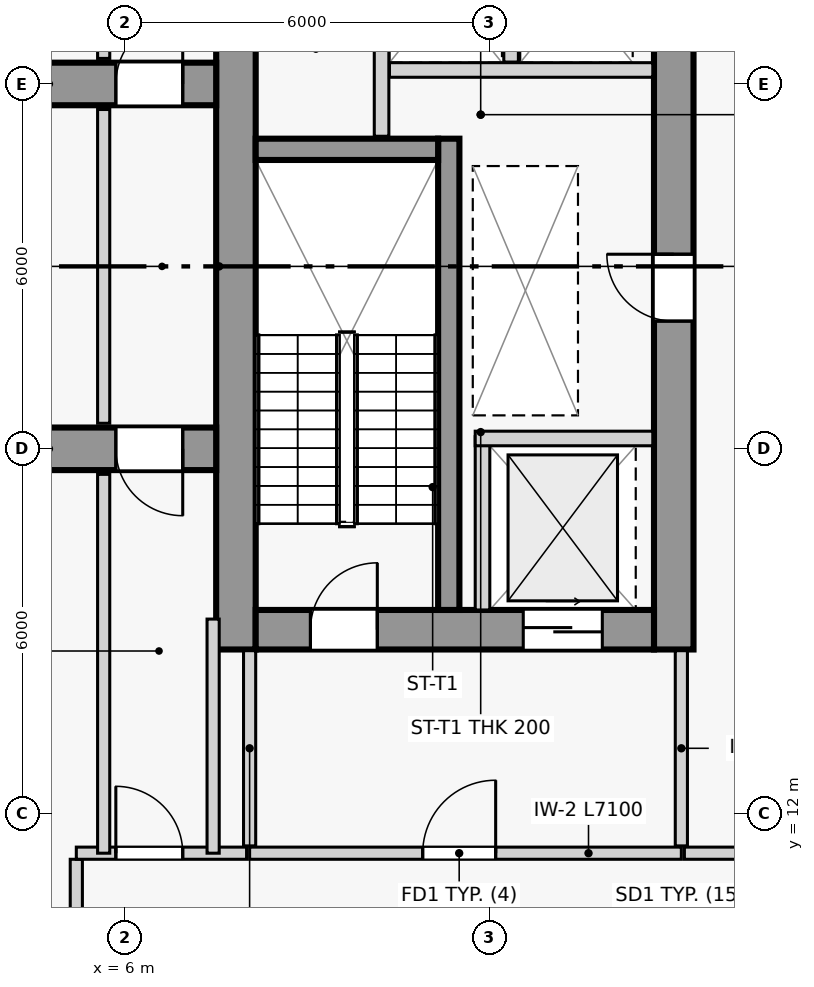
"""IFC4 building model, lengths in metres.
Left out: names, types, materials, properties, quantities, classifications, styles, units other than length and angle.
Written with IfcOpenShell. Run it as: python <this file> out.ifc"""

import sys

from ifc_helpers import new_model, si_unit, direction, frame, frame_2d, origin, place, context, subcontext, project, spatial, rectangle, extrude, source, transform, mapped, element, fill, save


model = new_model("IFC4")
c1 = context("Model", 3, precision=1e-05, world=origin(), true_north=direction((0.0, 1.0)))
c2 = subcontext(c1, "Body", "Model", "MODEL_VIEW")
j1 = project(units=[si_unit("LENGTHUNIT", "METRE"), si_unit("PLANEANGLEUNIT", "RADIAN")], contexts=[c1])
p1 = place(None, origin())
s1 = spatial("IfcSite", under=j1, at=p1, CompositionType="ELEMENT")
p2 = place(p1, origin())
s2 = spatial("IfcBuilding", under=s1, at=p2, CompositionType="ELEMENT")
p3 = place(p2, frame((0.0, 0.0, 220.5)))
s3 = spatial("IfcBuildingStorey", under=s2, at=p3, CompositionType="ELEMENT", Elevation=220.5)
p4 = place(p3, frame((7.825, 14.7, 0.0), z_axis=(0.0, 0.0, 1.0), x_axis=(0.0, 1.0, 0.0)))
e1 = element("IfcWall", 1, at=p4, inside=s3, PredefinedType="SHEAR", context=c2, shape_type="SweptSolid", body=[
    extrude(rectangle(XDim=12.65, YDim=0.65, at=frame_2d((6.325, 0.0))), origin(), (0.0, 0.0, 1.0), 7.2),
])
p5 = place(p3, frame((15.025, 14.7, 0.0), z_axis=(0.0, 0.0, 1.0), x_axis=(0.0, 1.0, 0.0)))
e2 = element("IfcWall", 2, at=p5, inside=s3, PredefinedType="SHEAR", context=c2, shape_type="SweptSolid", body=[
    extrude(rectangle(XDim=12.65, YDim=0.65, at=frame_2d((6.325, 0.0))), origin(), (0.0, 0.0, 1.0), 7.2),
])
p6 = place(p5, frame((5.4, 0.0, 0.0)))
e3 = element("IfcOpeningElement", 3, at=p6, cuts=e2, PredefinedType="OPENING", context=c2, shape_type="SweptSolid", body=[
    extrude(rectangle(XDim=1.1, YDim=2.2, at=frame_2d((0.55, 1.1))), frame((0.0, 0.335, 0.0), z_axis=(0.0, -1.0, 0.0), x_axis=(1.0, 0.0, 0.0)), (0.0, 0.0, 1.0), 0.67),
])
p7 = place(p3, frame((8.15, 15.025, 0.0), z_axis=(0.0, 0.0, 1.0), x_axis=(1.0, 0.0, 0.0)))
e4 = element("IfcWall", 4, at=p7, inside=s3, PredefinedType="SHEAR", context=c2, shape_type="SweptSolid", body=[
    extrude(rectangle(XDim=6.55, YDim=0.65, at=frame_2d((3.275, 0.0))), origin(), (0.0, 0.0, 1.0), 7.2),
])
p8 = place(p7, frame((0.9, 0.0, 0.0)))
e5 = element("IfcOpeningElement", 5, at=p8, cuts=e4, PredefinedType="OPENING", context=c2, shape_type="SweptSolid", body=[
    extrude(rectangle(XDim=1.1, YDim=2.2, at=frame_2d((0.55, 1.1))), frame((0.0, 0.335, 0.0), z_axis=(0.0, -1.0, 0.0), x_axis=(1.0, 0.0, 0.0)), (0.0, 0.0, 1.0), 0.67),
])
p9 = place(p7, frame((4.4, 0.0, 0.0)))
e6 = element("IfcOpeningElement", 6, at=p9, cuts=e4, PredefinedType="OPENING", context=c2, shape_type="SweptSolid", body=[
    extrude(rectangle(XDim=1.3, YDim=2.2, at=frame_2d((0.65, 1.1))), frame((0.0, 0.335, 0.0), z_axis=(0.0, -1.0, 0.0), x_axis=(1.0, 0.0, 0.0)), (0.0, 0.0, 1.0), 0.67),
])
p10 = place(p3, frame((11.325, 15.35, 0.0), z_axis=(0.0, 0.0, 1.0), x_axis=(0.0, 1.0, 0.0)))
e7 = element("IfcWall", 7, at=p10, inside=s3, PredefinedType="SHEAR", context=c2, shape_type="SweptSolid", body=[
    extrude(rectangle(XDim=7.75, YDim=0.35, at=frame_2d((3.875, 0.0))), origin(), (0.0, 0.0, 1.0), 7.2),
])
p11 = place(p3, frame((8.15, 22.925, 0.0), z_axis=(0.0, 0.0, 1.0), x_axis=(1.0, 0.0, 0.0)))
e8 = element("IfcWall", 8, at=p11, inside=s3, PredefinedType="SHEAR", context=c2, shape_type="SweptSolid", body=[
    extrude(rectangle(XDim=3.0, YDim=0.35, at=frame_2d((1.5, 0.0))), origin(), (0.0, 0.0, 1.0), 7.2),
])
p12 = place(p3, frame((3.65, 18.0, 0.0), z_axis=(0.0, 0.0, 1.0), x_axis=(1.0, 0.0, 0.0)))
e9 = element("IfcWall", 9, at=p12, inside=s3, PredefinedType="SOLIDWALL", context=c2, shape_type="SweptSolid", body=[
    extrude(rectangle(XDim=3.85, YDim=0.7, at=frame_2d((1.925, 0.0))), origin(), (0.0, 0.0, 1.0), 6.55),
])
p13 = place(p12, frame((2.2, 0.0, 0.0)))
e10 = element("IfcOpeningElement", 10, at=p13, cuts=e9, PredefinedType="OPENING", context=c2, shape_type="SweptSolid", body=[
    extrude(rectangle(XDim=1.1, YDim=2.2, at=frame_2d((0.55, 1.1))), frame((0.0, 0.36, 0.0), z_axis=(0.0, -1.0, 0.0), x_axis=(1.0, 0.0, 0.0)), (0.0, 0.0, 1.0), 0.72),
])
p14 = place(p3, frame((3.65, 24.0, 0.0), z_axis=(0.0, 0.0, 1.0), x_axis=(1.0, 0.0, 0.0)))
e11 = element("IfcWall", 11, at=p14, inside=s3, PredefinedType="SOLIDWALL", context=c2, shape_type="SweptSolid", body=[
    extrude(rectangle(XDim=3.85, YDim=0.7, at=frame_2d((1.925, 0.0))), origin(), (0.0, 0.0, 1.0), 6.55),
])
p15 = place(p14, frame((2.2, 0.0, 0.0)))
e12 = element("IfcOpeningElement", 12, at=p15, cuts=e11, PredefinedType="OPENING", context=c2, shape_type="SweptSolid", body=[
    extrude(rectangle(XDim=1.1, YDim=2.2, at=frame_2d((0.55, 1.1))), frame((0.0, 0.36, 0.0), z_axis=(0.0, -1.0, 0.0), x_axis=(1.0, 0.0, 0.0)), (0.0, 0.0, 1.0), 0.72),
])
p16 = place(p3, frame((11.88, 15.35, 0.0), z_axis=(0.0, 0.0, 1.0), x_axis=(0.0, 1.0, 0.0)))
e13 = element("IfcWall", 13, at=p16, inside=s3, PredefinedType="PARTITIONING", context=c2, shape_type="SweptSolid", body=[
    extrude(rectangle(XDim=2.85, YDim=0.24, at=frame_2d((1.425, 0.0))), origin(), (0.0, 0.0, 1.0), 6.55),
])
p17 = place(p3, frame((11.76, 18.17, 0.0), z_axis=(0.0, 0.0, 1.0), x_axis=(1.0, 0.0, 0.0)))
e14 = element("IfcWall", 14, at=p17, inside=s3, PredefinedType="PARTITIONING", context=c2, shape_type="SweptSolid", body=[
    extrude(rectangle(XDim=2.92, YDim=0.24, at=frame_2d((1.46, 0.0))), origin(), (0.0, 0.0, 1.0), 6.55),
])
p18 = place(p3, frame((8.05, 11.35, 0.0), z_axis=(0.0, 0.0, 1.0), x_axis=(1.0, 0.0, 0.0)))
e15 = element("IfcWall", 15, at=p18, inside=s3, PredefinedType="PARTITIONING", context=c2, shape_type="SweptSolid", body=[
    extrude(rectangle(XDim=7.1, YDim=0.2, at=frame_2d((3.55, 0.0))), origin(), (0.0, 0.0, 1.0), 4.95),
])
p19 = place(p18, frame((2.846, 0.0, 0.0)))
e16 = element("IfcOpeningElement", 16, at=p19, cuts=e15, PredefinedType="OPENING", context=c2, shape_type="SweptSolid", body=[
    extrude(rectangle(XDim=1.2, YDim=2.2, at=frame_2d((0.6, 1.1))), frame((0.0, 0.11, 0.0), z_axis=(0.0, -1.0, 0.0), x_axis=(1.0, 0.0, 0.0)), (0.0, 0.0, 1.0), 0.22),
])
for number, where, z_axis, x_axis in (
    (17, (8.05, 11.47, 0.0), (0.0, 0.0, 1.0), (0.0, 1.0, 0.0)),
    (18, (15.15, 11.47, 0.0), (0.0, 0.0, 1.0), (0.0, 1.0, 0.0)),
):
    element("IfcWall", number, at=place(p3, frame(where, z_axis=z_axis, x_axis=x_axis)), inside=s3, PredefinedType="PARTITIONING", context=c2, shape_type="SweptSolid", body=[
        extrude(rectangle(XDim=3.21, YDim=0.2, at=frame_2d((1.605, 0.0))), origin(), (0.0, 0.0, 1.0), 6.55),
    ])
p20 = place(p3, frame((10.22, 23.14, 0.0), z_axis=(0.0, 0.0, 1.0), x_axis=(0.0, 1.0, 0.0)))
e19 = element("IfcWall", 19, at=p20, inside=s3, PredefinedType="PARTITIONING", context=c2, shape_type="SweptSolid", body=[
    extrude(rectangle(XDim=3.54, YDim=0.24, at=frame_2d((1.77, 0.0))), origin(), (0.0, 0.0, 1.0), 6.55),
])
p21 = place(p3, frame((10.35, 24.23, 0.0), z_axis=(0.0, 0.0, 1.0), x_axis=(1.0, 0.0, 0.0)))
e20 = element("IfcWall", 20, at=p21, inside=s3, PredefinedType="PARTITIONING", context=c2, shape_type="SweptSolid", body=[
    extrude(rectangle(XDim=4.33, YDim=0.24, at=frame_2d((2.165, 0.0))), origin(), (0.0, 0.0, 1.0), 6.55),
])
p22 = place(p3, frame((12.35, 24.36, 0.0), z_axis=(0.0, 0.0, 1.0), x_axis=(0.0, 1.0, 0.0)))
e21 = element("IfcWall", 21, at=p22, inside=s3, PredefinedType="PARTITIONING", context=c2, shape_type="SweptSolid", body=[
    extrude(rectangle(XDim=2.32, YDim=0.24, at=frame_2d((1.16, 0.0))), origin(), (0.0, 0.0, 1.0), 6.55),
])
p23 = place(p3, frame((5.2, 2.77, 0.0), z_axis=(0.0, 0.0, 1.0), x_axis=(0.0, 1.0, 0.0)))
e22 = element("IfcWall", 22, at=p23, inside=s3, PredefinedType="PARTITIONING", context=c2, shape_type="SweptSolid", body=[
    extrude(rectangle(XDim=8.48, YDim=0.2, at=frame_2d((4.24, 0.0))), origin(), (0.0, 0.0, 1.0), 6.55),
])
p24 = place(p3, frame((5.2, 11.35, 0.0), z_axis=(0.0, 0.0, 1.0), x_axis=(1.0, 0.0, 0.0)))
e23 = element("IfcWall", 23, at=p24, inside=s3, PredefinedType="PARTITIONING", context=c2, shape_type="SweptSolid", body=[
    extrude(rectangle(XDim=2.8, YDim=0.2, at=frame_2d((1.4, 0.0))), origin(), (0.0, 0.0, 1.0), 4.95),
])
p25 = place(p24, frame((0.65, 0.0, 0.0)))
e24 = element("IfcOpeningElement", 24, at=p25, cuts=e23, PredefinedType="OPENING", context=c2, shape_type="SweptSolid", body=[
    extrude(rectangle(XDim=1.1, YDim=2.2, at=frame_2d((0.55, 1.1))), frame((0.0, 0.11, 0.0), z_axis=(0.0, -1.0, 0.0), x_axis=(1.0, 0.0, 0.0)), (0.0, 0.0, 1.0), 0.22),
])
p26 = place(p3, frame((15.2, 11.35, 0.0), z_axis=(0.0, 0.0, 1.0), x_axis=(1.0, 0.0, 0.0)))
e25 = element("IfcWall", 25, at=p26, inside=s3, PredefinedType="PARTITIONING", context=c2, shape_type="SweptSolid", body=[
    extrude(rectangle(XDim=15.8, YDim=0.2, at=frame_2d((7.9, 0.0))), origin(), (0.0, 0.0, 1.0), 4.95),
])
p27 = place(p3, frame((5.65, 11.35, 0.0), z_axis=(0.0, 0.0, 1.0), x_axis=(0.0, 1.0, 0.0)))
e26 = element("IfcWall", 26, at=p27, inside=s3, PredefinedType="PARTITIONING", context=c2, shape_type="SweptSolid", body=[
    extrude(rectangle(XDim=6.23, YDim=0.2, at=frame_2d((3.115, 0.0))), origin(), (0.0, 0.0, 1.0), 6.55),
])
p28 = place(p3, frame((5.65, 18.42, 0.0), z_axis=(0.0, 0.0, 1.0), x_axis=(0.0, 1.0, 0.0)))
e27 = element("IfcWall", 27, at=p28, inside=s3, PredefinedType="PARTITIONING", context=c2, shape_type="SweptSolid", body=[
    extrude(rectangle(XDim=5.16, YDim=0.2, at=frame_2d((2.58, 0.0))), origin(), (0.0, 0.0, 1.0), 6.55),
])
p29 = place(p3, frame((5.65, 24.42, 0.0), z_axis=(0.0, 0.0, 1.0), x_axis=(0.0, 1.0, 0.0)))
e28 = element("IfcWall", 28, at=p29, inside=s3, PredefinedType="PARTITIONING", context=c2, shape_type="SweptSolid", body=[
    extrude(rectangle(XDim=8.08, YDim=0.2, at=frame_2d((4.04, 0.0))), origin(), (0.0, 0.0, 1.0), 6.55),
])
p30 = place(p3, frame((7.45, 11.35, 0.0), z_axis=(0.0, 0.0, 1.0), x_axis=(0.0, 1.0, 0.0)))
e29 = element("IfcWall", 29, at=p30, inside=s3, PredefinedType="PARTITIONING", context=c2, shape_type="SweptSolid", body=[
    extrude(rectangle(XDim=3.85, YDim=0.2, at=frame_2d((1.925, 0.0))), origin(), (0.0, 0.0, 1.0), 6.55),
])
m1 = source(origin(), c2, "Body", "SweptSolid", [
    extrude(rectangle(XDim=1.1, YDim=2.2, at=frame_2d((0.55, 1.1))), frame((0.0, 0.025, 0.0), z_axis=(0.0, -1.0, 0.0), x_axis=(1.0, 0.0, 0.0)), (0.0, 0.0, 1.0), 0.05),
])
p31 = place(p8, origin())
e30 = element("IfcDoor", 30, at=p31, inside=s3, OperationType="SINGLE_SWING_RIGHT", PredefinedType="DOOR", context=c2, shape_type="MappedRepresentation", body=[
    mapped(m1, transform((0.0, 0.0, 0.0), scale=1.0)),
])
fill(e5, e30)
m2 = source(origin(), c2, "Body", "SweptSolid", [
    extrude(rectangle(XDim=1.3, YDim=2.2, at=frame_2d((0.65, 1.1))), frame((0.0, 0.025, 0.0), z_axis=(0.0, -1.0, 0.0), x_axis=(1.0, 0.0, 0.0)), (0.0, 0.0, 1.0), 0.05),
])
p32 = place(p9, origin())
e31 = element("IfcDoor", 31, at=p32, inside=s3, OperationType="SLIDING_TO_RIGHT", PredefinedType="DOOR", context=c2, shape_type="MappedRepresentation", body=[
    mapped(m2, transform((0.0, 0.0, 0.0), scale=1.0)),
])
fill(e6, e31)
m3 = source(origin(), c2, "Body", "SweptSolid", [
    extrude(rectangle(XDim=1.2, YDim=2.2, at=frame_2d((0.6, 1.1))), frame((0.0, 0.025, 0.0), z_axis=(0.0, -1.0, 0.0), x_axis=(1.0, 0.0, 0.0)), (0.0, 0.0, 1.0), 0.05),
])
p33 = place(p19, origin())
e32 = element("IfcDoor", 32, at=p33, inside=s3, OperationType="SINGLE_SWING_RIGHT", PredefinedType="DOOR", context=c2, shape_type="MappedRepresentation", body=[
    mapped(m3, transform((0.0, 0.0, 0.0), scale=1.0)),
])
fill(e16, e32)
p34 = place(p6, origin())
e33 = element("IfcDoor", 33, at=p34, inside=s3, OperationType="SINGLE_SWING_RIGHT", PredefinedType="DOOR", context=c2, shape_type="MappedRepresentation", body=[
    mapped(m1, transform((0.0, 0.0, 0.0), scale=1.0)),
])
fill(e3, e33)
p35 = place(p13, frame((1.1, 0.0, 0.0), z_axis=(0.0, 0.0, 1.0), x_axis=(-1.0, 0.0, 0.0)))
e34 = element("IfcDoor", 34, at=p35, inside=s3, OperationType="SINGLE_SWING_LEFT", PredefinedType="DOOR", context=c2, shape_type="MappedRepresentation", body=[
    mapped(m1, transform((0.0, 0.0, 0.0), scale=1.0)),
])
fill(e10, e34)
p36 = place(p15, origin())
e35 = element("IfcDoor", 35, at=p36, inside=s3, OperationType="SINGLE_SWING_RIGHT", PredefinedType="DOOR", context=c2, shape_type="MappedRepresentation", body=[
    mapped(m1, transform((0.0, 0.0, 0.0), scale=1.0)),
])
fill(e12, e35)
p37 = place(p25, origin())
e36 = element("IfcDoor", 36, at=p37, inside=s3, OperationType="SINGLE_SWING_LEFT", PredefinedType="DOOR", context=c2, shape_type="MappedRepresentation", body=[
    mapped(m1, transform((0.0, 0.0, 0.0), scale=1.0)),
])
fill(e24, e36)
save(model, sys.argv[1])
